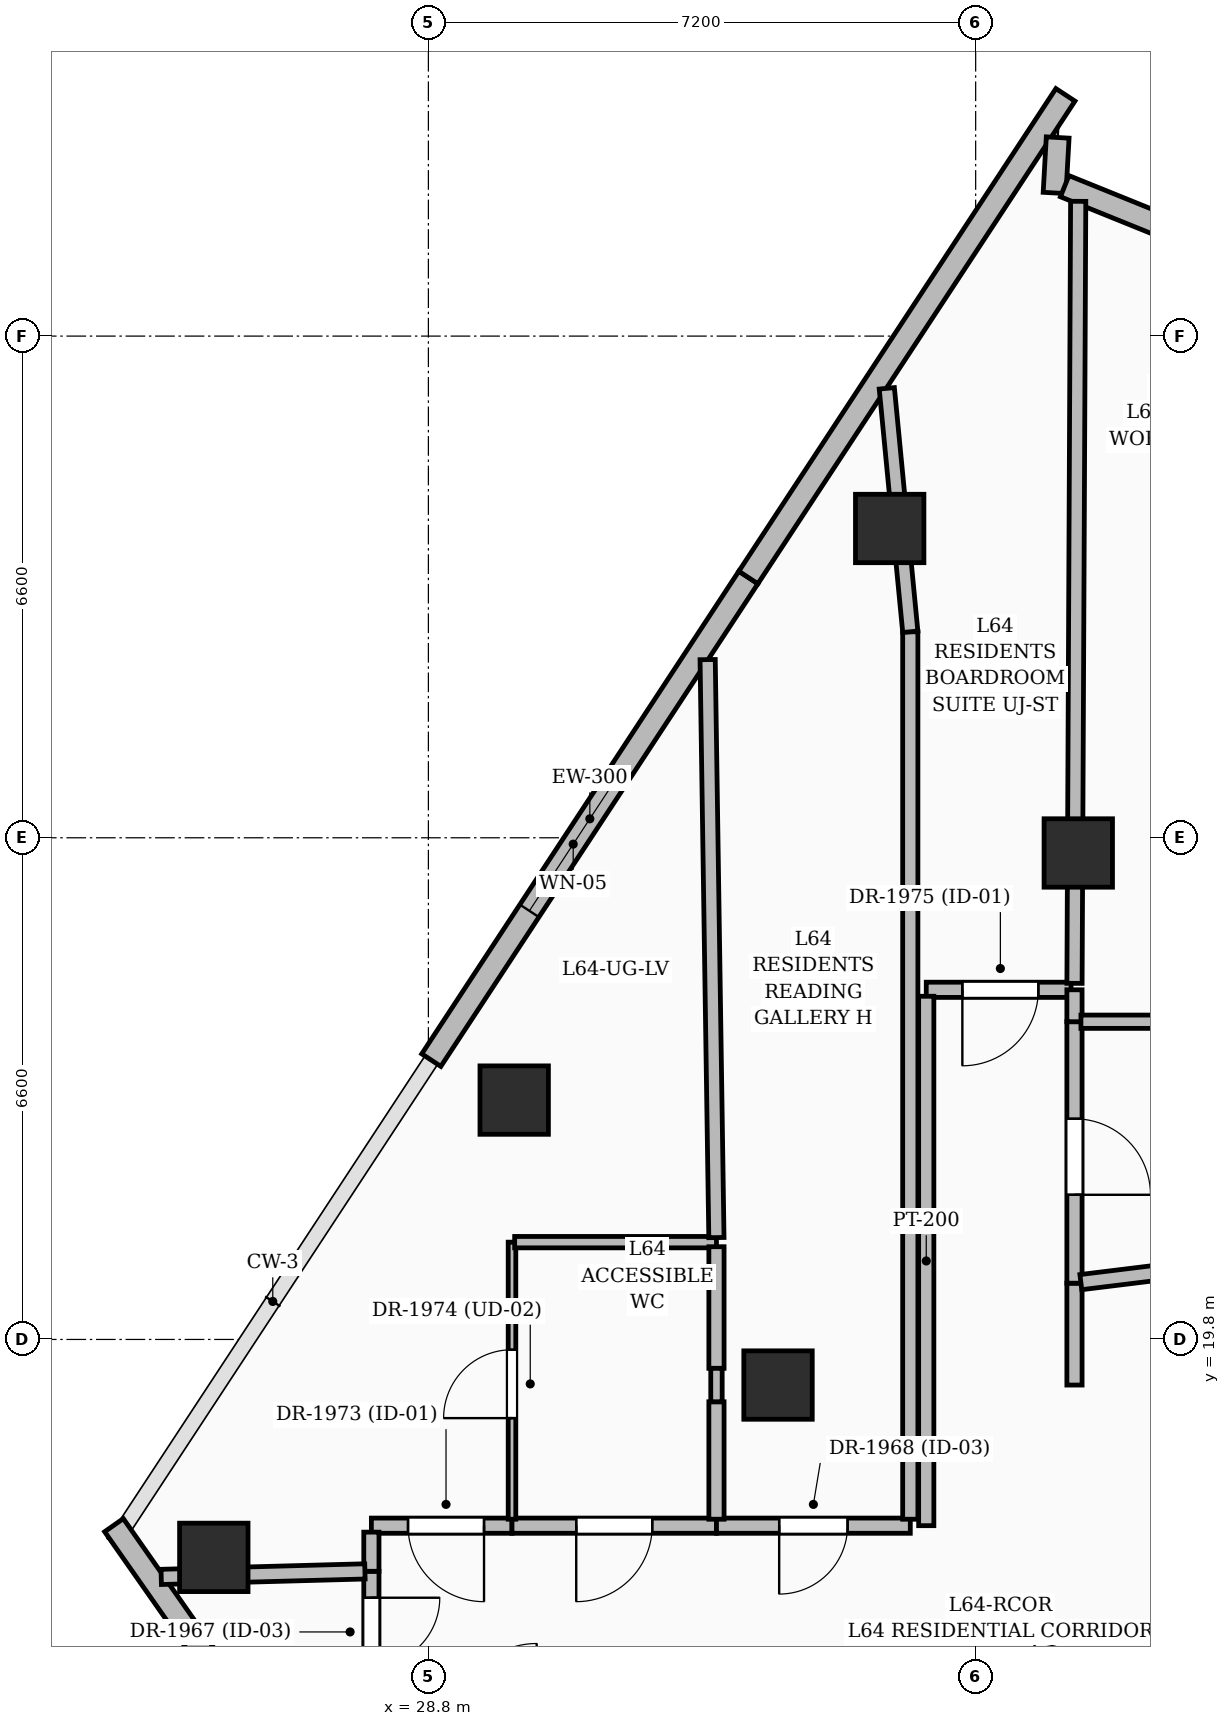
"""IFC4 building model, lengths in metres.
Left out: names, types, materials, properties, quantities, classifications, styles, units other than length and angle.
Written with IfcOpenShell. Run it as: python <this file> out.ifc"""

import sys

from ifc_helpers import new_model, si_unit, direction, frame, frame_2d, origin, origin_2d, place, context, subcontext, project, spatial, rectangle, extrude, element, fill, save


model = new_model("IFC4")
c1 = context("Model", 3, precision=1e-05, world=origin(), true_north=direction((0.0, 1.0)))
c2 = subcontext(c1, "Body", "Model", "MODEL_VIEW")
j1 = project(units=[si_unit("LENGTHUNIT", "METRE"), si_unit("PLANEANGLEUNIT", "RADIAN")], contexts=[c1])
p1 = place(None, origin())
s1 = spatial("IfcSite", under=j1, at=p1, CompositionType="ELEMENT")
p2 = place(p1, origin())
s2 = spatial("IfcBuilding", under=s1, at=p2, CompositionType="ELEMENT")
p3 = place(p2, frame((0.0, 0.0, 248.25)))
s3 = spatial("IfcBuildingStorey", under=s2, at=p3, CompositionType="ELEMENT", Elevation=248.25)
for number, where, z_axis, x_axis in (
    (1, (37.35, 26.2, 0.0), (0.0, 0.0, 1.0), (1.0, 0.0, 0.0)),
    (2, (33.4, 19.2, 0.0), (0.0, 0.0, 1.0), (1.0, 0.0, 0.0)),
    (3, (34.869, 30.469, 0.0), (0.0, 0.0, 1.0), (1.0, 0.0, 0.0)),
    (4, (29.929, 22.949, 0.0), (0.0, 0.0, 1.0), (1.0, 0.0, 0.0)),
    (5, (25.977, 16.933, 0.0), (0.0, 0.0, 1.0), (1.0, 0.0, 0.0)),
):
    element("IfcColumn", number, at=place(p3, frame(where, z_axis=z_axis, x_axis=x_axis)), inside=s3, PredefinedType="COLUMN", context=c2, shape_type="SweptSolid", body=[
        extrude(rectangle(XDim=0.9, YDim=0.9, at=origin_2d()), origin(), (0.0, 0.0, 1.0), 3.75),
    ])
p4 = place(p3, frame((26.151, 15.232, 0.0), z_axis=(0.0, 0.0, 1.0), x_axis=(-0.573607655321, 0.819130183644, 0.0)))
e6 = element("IfcWall", 6, at=p4, inside=s3, PredefinedType="SOLIDWALL", context=c2, shape_type="SweptSolid", body=[
    extrude(rectangle(XDim=2.593, YDim=0.3, at=frame_2d((1.297, 0.0))), origin(), (0.0, 0.0, 1.0), 2.825),
])
p5 = place(p3, frame((28.838, 23.475, 0.0), z_axis=(0.0, 0.0, 1.0), x_axis=(0.549043857383, 0.835793540697, 0.0)))
e7 = element("IfcWall", 7, at=p5, inside=s3, PredefinedType="SOLIDWALL", context=c2, shape_type="SweptSolid", body=[
    extrude(rectangle(XDim=7.597, YDim=0.3, at=frame_2d((3.799, 0.0))), origin(), (0.0, 0.0, 1.0), 3.5),
])
p6 = place(p5, frame((2.35, 0.0, 0.55)))
e8 = element("IfcOpeningElement", 8, at=p6, cuts=e7, PredefinedType="OPENING", context=c2, shape_type="SweptSolid", body=[
    extrude(rectangle(XDim=2.1, YDim=2.4, at=frame_2d((1.05, 1.2))), frame((0.0, 0.16, 0.0), z_axis=(0.0, -1.0, 0.0), x_axis=(1.0, 0.0, 0.0)), (0.0, 0.0, 1.0), 0.32),
])
p7 = place(p3, frame((33.01, 29.824, 0.0), z_axis=(0.0, 0.0, 1.0), x_axis=(0.549051558848, 0.835788481451, 0.0)))
e9 = element("IfcWall", 9, at=p7, inside=s3, PredefinedType="SOLIDWALL", context=c2, shape_type="SweptSolid", body=[
    extrude(rectangle(XDim=7.597, YDim=0.3, at=frame_2d((3.799, 0.0))), origin(), (0.0, 0.0, 1.0), 3.5),
])
p8 = place(p3, frame((37.079, 35.613, 0.0), z_axis=(0.0, 0.0, 1.0), x_axis=(-0.056136239568, -0.998423118025, 0.0)))
e10 = element("IfcWall", 10, at=p8, inside=s3, PredefinedType="SOLIDWALL", context=c2, shape_type="SweptSolid", body=[
    extrude(rectangle(XDim=0.731, YDim=0.3, at=frame_2d((0.365, 0.0))), origin(), (0.0, 0.0, 1.0), 3.5),
])
p9 = place(p3, frame((37.171, 34.972, 0.0), z_axis=(0.0, 0.0, 1.0), x_axis=(0.927076098221, -0.37487318937, 0.0)))
e11 = element("IfcWall", 11, at=p9, inside=s3, PredefinedType="SOLIDWALL", context=c2, shape_type="SweptSolid", body=[
    extrude(rectangle(XDim=2.126, YDim=0.3, at=frame_2d((1.063, 0.0))), origin(), (0.0, 0.0, 1.0), 3.5),
])
p10 = place(p3, frame((28.05, 16.75, 0.0), z_axis=(0.0, 0.0, 1.0), x_axis=(0.0, -1.0, 0.0)))
e12 = element("IfcWall", 12, at=p10, inside=s3, PredefinedType="PARTITIONING", context=c2, shape_type="SweptSolid", body=[
    extrude(rectangle(XDim=1.7, YDim=0.2, at=frame_2d((0.85, 0.0))), origin(), (0.0, 0.0, 1.0), 3.5),
])
p11 = place(p10, frame((0.348, 0.0, 0.0)))
e13 = element("IfcOpeningElement", 13, at=p11, cuts=e12, PredefinedType="OPENING", context=c2, shape_type="SweptSolid", body=[
    extrude(rectangle(XDim=0.9, YDim=2.1, at=frame_2d((0.45, 1.05))), frame((0.0, 0.11, 0.0), z_axis=(0.0, -1.0, 0.0), x_axis=(1.0, 0.0, 0.0)), (0.0, 0.0, 1.0), 0.22),
])
p12 = place(p3, frame((37.3, 19.2, 0.0), z_axis=(0.0, 0.0, 1.0), x_axis=(0.0, 1.0, 0.0)))
e14 = element("IfcWall", 14, at=p12, inside=s3, PredefinedType="PARTITIONING", context=c2, shape_type="SweptSolid", body=[
    extrude(rectangle(XDim=1.34, YDim=0.2, at=frame_2d((0.67, 0.0))), origin(), (0.0, 0.0, 1.0), 3.5),
])
p13 = place(p3, frame((29.9, 17.35, 0.0), z_axis=(0.0, 0.0, 1.0), x_axis=(-1.0, 0.0, 0.0)))
e15 = element("IfcWall", 15, at=p13, inside=s3, PredefinedType="PARTITIONING", context=c2, shape_type="SweptSolid", body=[
    extrude(rectangle(XDim=1.85, YDim=0.2, at=frame_2d((0.925, 0.0))), origin(), (0.0, 0.0, 1.0), 3.5),
])
p14 = place(p13, frame((0.368, 0.0, 0.0)))
e16 = element("IfcOpeningElement", 16, at=p14, cuts=e15, PredefinedType="OPENING", context=c2, shape_type="SweptSolid", body=[
    extrude(rectangle(XDim=1.0, YDim=2.2, at=frame_2d((0.5, 1.1))), frame((0.0, 0.11, 0.0), z_axis=(0.0, -1.0, 0.0), x_axis=(1.0, 0.0, 0.0)), (0.0, 0.0, 1.0), 0.22),
])
p15 = place(p3, frame((28.05, 17.265, 0.0), z_axis=(0.0, 0.0, 1.0), x_axis=(0.0, -1.0, 0.0)))
e17 = element("IfcWall", 17, at=p15, inside=s3, PredefinedType="PARTITIONING", context=c2, shape_type="SweptSolid", body=[
    extrude(rectangle(XDim=0.515, YDim=0.2, at=frame_2d((0.257, 0.0))), origin(), (0.0, 0.0, 1.0), 3.5),
])
p16 = place(p3, frame((32.59, 17.35, 0.0), z_axis=(0.0, 0.0, 1.0), x_axis=(-1.0, 0.0, 0.0)))
e18 = element("IfcWall", 18, at=p16, inside=s3, PredefinedType="PARTITIONING", context=c2, shape_type="SweptSolid", body=[
    extrude(rectangle(XDim=2.69, YDim=0.2, at=frame_2d((1.345, 0.0))), origin(), (0.0, 0.0, 1.0), 3.5),
])
p17 = place(p16, frame((0.845, 0.0, 0.0)))
e19 = element("IfcOpeningElement", 19, at=p17, cuts=e18, PredefinedType="OPENING", context=c2, shape_type="SweptSolid", body=[
    extrude(rectangle(XDim=1.0, YDim=2.2, at=frame_2d((0.5, 1.1))), frame((0.0, 0.11, 0.0), z_axis=(0.0, -1.0, 0.0), x_axis=(1.0, 0.0, 0.0)), (0.0, 0.0, 1.0), 0.22),
])
p18 = place(p3, frame((35.14, 17.35, 0.0), z_axis=(0.0, 0.0, 1.0), x_axis=(-1.0, 0.0, 0.0)))
e20 = element("IfcWall", 20, at=p18, inside=s3, PredefinedType="PARTITIONING", context=c2, shape_type="SweptSolid", body=[
    extrude(rectangle(XDim=2.55, YDim=0.2, at=frame_2d((1.275, 0.0))), origin(), (0.0, 0.0, 1.0), 2.685),
])
p19 = place(p18, frame((0.825, 0.0, 0.0)))
e21 = element("IfcOpeningElement", 21, at=p19, cuts=e20, PredefinedType="OPENING", context=c2, shape_type="SweptSolid", body=[
    extrude(rectangle(XDim=0.9, YDim=2.1, at=frame_2d((0.45, 1.05))), frame((0.0, 0.11, 0.0), z_axis=(0.0, -1.0, 0.0), x_axis=(1.0, 0.0, 0.0)), (0.0, 0.0, 1.0), 0.22),
])
p20 = place(p3, frame((37.255, 24.4, 0.0), z_axis=(0.0, 0.0, 1.0), x_axis=(-1.0, 0.0, 0.0)))
e22 = element("IfcWall", 22, at=p20, inside=s3, PredefinedType="PARTITIONING", context=c2, shape_type="SweptSolid", body=[
    extrude(rectangle(XDim=1.905, YDim=0.2, at=frame_2d((0.952, 0.0))), origin(), (0.0, 0.0, 1.0), 2.685),
])
p21 = place(p20, frame((0.43, 0.0, 0.0)))
e23 = element("IfcOpeningElement", 23, at=p21, cuts=e22, PredefinedType="OPENING", context=c2, shape_type="SweptSolid", body=[
    extrude(rectangle(XDim=1.0, YDim=2.2, at=frame_2d((0.5, 1.1))), frame((0.0, 0.11, 0.0), z_axis=(0.0, -1.0, 0.0), x_axis=(1.0, 0.0, 0.0)), (0.0, 0.0, 1.0), 0.22),
])
p22 = place(p3, frame((35.35, 24.315, 0.0), z_axis=(0.0, 0.0, 1.0), x_axis=(0.0, -1.0, 0.0)))
e24 = element("IfcWall", 24, at=p22, inside=s3, PredefinedType="PARTITIONING", context=c2, shape_type="SweptSolid", body=[
    extrude(rectangle(XDim=6.965, YDim=0.2, at=frame_2d((3.482, 0.0))), origin(), (0.0, 0.0, 1.0), 2.685),
])
p23 = place(p3, frame((37.3, 23.98, 0.0), z_axis=(0.0, 0.0, 1.0), x_axis=(0.0, -1.0, 0.0)))
e25 = element("IfcWall", 25, at=p23, inside=s3, PredefinedType="PARTITIONING", context=c2, shape_type="SweptSolid", body=[
    extrude(rectangle(XDim=3.44, YDim=0.2, at=frame_2d((1.72, 0.0))), origin(), (0.0, 0.0, 1.0), 3.5),
])
p24 = place(p23, frame((1.277, 0.0, 0.0)))
e26 = element("IfcOpeningElement", 26, at=p24, cuts=e25, PredefinedType="OPENING", context=c2, shape_type="SweptSolid", body=[
    extrude(rectangle(XDim=1.0, YDim=2.2, at=frame_2d((0.5, 1.1))), frame((0.0, 0.11, 0.0), z_axis=(0.0, -1.0, 0.0), x_axis=(1.0, 0.0, 0.0)), (0.0, 0.0, 1.0), 0.22),
])
p25 = place(p3, frame((37.3, 23.98, 0.0), z_axis=(0.0, 0.0, 1.0), x_axis=(0.0, 1.0, 0.0)))
e27 = element("IfcWall", 27, at=p25, inside=s3, PredefinedType="PARTITIONING", context=c2, shape_type="SweptSolid", body=[
    extrude(rectangle(XDim=0.42, YDim=0.2, at=frame_2d((0.21, 0.0))), origin(), (0.0, 0.0, 1.0), 3.5),
])
p26 = place(p3, frame((27.965, 16.749, 0.0), z_axis=(0.0, 0.0, 1.0), x_axis=(-0.999634238385, -0.027044212862, 0.0)))
e28 = element("IfcWall", 28, at=p26, inside=s3, PredefinedType="PARTITIONING", context=c2, shape_type="SweptSolid", body=[
    extrude(rectangle(XDim=2.681, YDim=0.2, at=frame_2d((1.341, 0.0))), origin(), (0.0, 0.0, 1.0), 2.82),
])
p27 = place(p3, frame((44.69, 21.453, 0.0), z_axis=(0.0, 0.0, 1.0), x_axis=(-0.992524860777, -0.12204261854, 0.0)))
e29 = element("IfcWall", 29, at=p27, inside=s3, PredefinedType="PARTITIONING", context=c2, shape_type="SweptSolid", body=[
    extrude(rectangle(XDim=7.362, YDim=0.2, at=frame_2d((3.681, 0.0))), origin(), (0.0, 0.0, 1.0), 2.685),
])
p28 = place(p3, frame((29.9, 17.435, 0.0), z_axis=(0.0, 0.0, 1.0), x_axis=(0.0, 1.0, 0.0)))
e30 = element("IfcWall", 30, at=p28, inside=s3, PredefinedType="PARTITIONING", context=c2, shape_type="SweptSolid", body=[
    extrude(rectangle(XDim=3.645, YDim=0.1, at=frame_2d((1.823, 0.0))), origin(), (0.0, 0.0, 1.0), 3.5),
])
p29 = place(p28, frame((1.33, 0.0, 0.0)))
e31 = element("IfcOpeningElement", 31, at=p29, cuts=e30, PredefinedType="OPENING", context=c2, shape_type="SweptSolid", body=[
    extrude(rectangle(XDim=0.9, YDim=2.15, at=frame_2d((0.45, 1.075))), frame((0.0, 0.06, 0.0), z_axis=(0.0, -1.0, 0.0), x_axis=(1.0, 0.0, 0.0)), (0.0, 0.0, 1.0), 0.12),
])
p30 = place(p3, frame((29.935, 21.08, 0.0), z_axis=(0.0, 0.0, 1.0), x_axis=(1.0, 0.0, 0.0)))
e32 = element("IfcWall", 32, at=p30, inside=s3, PredefinedType="PARTITIONING", context=c2, shape_type="SweptSolid", body=[
    extrude(rectangle(XDim=2.655, YDim=0.15, at=frame_2d((1.328, 0.0))), origin(), (0.0, 0.0, 1.0), 1.27),
])
p31 = place(p3, frame((32.589, 21.14, 0.0), z_axis=(0.0, 0.0, 1.0), x_axis=(-0.015152694096, 0.99988519134, 0.0)))
e33 = element("IfcWall", 33, at=p31, inside=s3, PredefinedType="PARTITIONING", context=c2, shape_type="SweptSolid", body=[
    extrude(rectangle(XDim=7.605, YDim=0.2, at=frame_2d((3.802, 0.0))), origin(), (0.0, 0.0, 1.0), 2.82),
])
p32 = place(p3, frame((32.59, 17.435, 0.0), z_axis=(0.0, 0.0, 1.0), x_axis=(0.0, 1.0, 0.0)))
e34 = element("IfcWall", 34, at=p32, inside=s3, PredefinedType="PARTITIONING", context=c2, shape_type="SweptSolid", body=[
    extrude(rectangle(XDim=1.545, YDim=0.2, at=frame_2d((0.772, 0.0))), origin(), (0.0, 0.0, 1.0), 3.5),
])
p33 = place(p3, frame((32.59, 19.42, 0.0), z_axis=(0.0, 0.0, 1.0), x_axis=(0.0, 1.0, 0.0)))
e35 = element("IfcWall", 35, at=p33, inside=s3, PredefinedType="PARTITIONING", context=c2, shape_type="SweptSolid", body=[
    extrude(rectangle(XDim=1.6, YDim=0.2, at=frame_2d((0.8, 0.0))), origin(), (0.0, 0.0, 1.0), 1.27),
])
p34 = place(p3, frame((35.14, 17.435, 0.0), z_axis=(0.0, 0.0, 1.0), x_axis=(0.0, 1.0, 0.0)))
e36 = element("IfcWall", 36, at=p34, inside=s3, PredefinedType="PARTITIONING", context=c2, shape_type="SweptSolid", body=[
    extrude(rectangle(XDim=11.675, YDim=0.2, at=frame_2d((5.837, 0.0))), origin(), (0.0, 0.0, 1.0), 1.27),
])
p35 = place(p3, frame((35.14, 29.11, 0.0), z_axis=(0.0, 0.0, 1.0), x_axis=(-0.095979864608, 0.995383275723, 0.0)))
e37 = element("IfcWall", 37, at=p35, inside=s3, PredefinedType="PARTITIONING", context=c2, shape_type="SweptSolid", body=[
    extrude(rectangle(XDim=3.218, YDim=0.2, at=frame_2d((1.609, 0.0))), origin(), (0.0, 0.0, 1.0), 1.27),
])
p36 = place(p3, frame((40.92, 23.98, 0.0), z_axis=(0.0, 0.0, 1.0), x_axis=(-1.0, 0.0, 0.0)))
e38 = element("IfcWall", 38, at=p36, inside=s3, PredefinedType="PARTITIONING", context=c2, shape_type="SweptSolid", body=[
    extrude(rectangle(XDim=3.535, YDim=0.175, at=frame_2d((1.768, 0.0))), origin(), (0.0, 0.0, 1.0), 3.5),
])
p37 = place(p3, frame((37.3, 24.485, 0.0), z_axis=(0.0, 0.0, 1.0), x_axis=(0.004746143653, 0.999988736997, 0.0)))
e39 = element("IfcWall", 39, at=p37, inside=s3, PredefinedType="PARTITIONING", context=c2, shape_type="SweptSolid", body=[
    extrude(rectangle(XDim=10.288, YDim=0.2, at=frame_2d((5.144, 0.0))), origin(), (0.0, 0.0, 1.0), 1.27),
])
p38 = place(p3, frame((32.59, 18.98, 0.0), z_axis=(0.0, 0.0, 1.0), x_axis=(0.0, 1.0, 0.0)))
e40 = element("IfcWall", 40, at=p38, inside=s3, PredefinedType="PARTITIONING", context=c2, shape_type="SweptSolid", body=[
    extrude(rectangle(XDim=0.44, YDim=0.15, at=frame_2d((0.22, 0.0))), origin(), (0.0, 0.0, 1.0), 1.27),
])
p39 = place(p6, origin())
e41 = element("IfcWindow", 41, at=p39, inside=s3, PartitioningType="SINGLE_PANEL", PredefinedType="WINDOW", context=c2, shape_type="SweptSolid", body=[
    extrude(rectangle(XDim=2.1, YDim=2.4, at=frame_2d((1.05, 1.2))), frame((0.0, 0.03, 0.0), z_axis=(0.0, -1.0, 0.0), x_axis=(1.0, 0.0, 0.0)), (0.0, 0.0, 1.0), 0.06),
])
fill(e8, e41)
p40 = place(p11, origin())
e42 = element("IfcDoor", 42, at=p40, inside=s3, OperationType="SINGLE_SWING_LEFT", PredefinedType="DOOR", context=c2, shape_type="SweptSolid", body=[
    extrude(rectangle(XDim=0.9, YDim=2.1, at=frame_2d((0.45, 1.05))), frame((0.0, 0.025, 0.0), z_axis=(0.0, -1.0, 0.0), x_axis=(1.0, 0.0, 0.0)), (0.0, 0.0, 1.0), 0.05),
])
fill(e13, e42)
p41 = place(p19, origin())
e43 = element("IfcDoor", 43, at=p41, inside=s3, OperationType="SINGLE_SWING_RIGHT", PredefinedType="DOOR", context=c2, shape_type="SweptSolid", body=[
    extrude(rectangle(XDim=0.9, YDim=2.1, at=frame_2d((0.45, 1.05))), frame((0.0, 0.025, 0.0), z_axis=(0.0, -1.0, 0.0), x_axis=(1.0, 0.0, 0.0)), (0.0, 0.0, 1.0), 0.05),
])
fill(e21, e43)
p42 = place(p14, origin())
e44 = element("IfcDoor", 44, at=p42, inside=s3, OperationType="SINGLE_SWING_LEFT", PredefinedType="DOOR", context=c2, shape_type="SweptSolid", body=[
    extrude(rectangle(XDim=1.0, YDim=2.2, at=frame_2d((0.5, 1.1))), frame((0.0, 0.025, 0.0), z_axis=(0.0, -1.0, 0.0), x_axis=(1.0, 0.0, 0.0)), (0.0, 0.0, 1.0), 0.05),
])
fill(e16, e44)
p43 = place(p29, origin())
e45 = element("IfcDoor", 45, at=p43, inside=s3, OperationType="SINGLE_SWING_LEFT", PredefinedType="DOOR", context=c2, shape_type="SweptSolid", body=[
    extrude(rectangle(XDim=0.9, YDim=2.15, at=frame_2d((0.45, 1.075))), frame((0.0, 0.025, 0.0), z_axis=(0.0, -1.0, 0.0), x_axis=(1.0, 0.0, 0.0)), (0.0, 0.0, 1.0), 0.05),
])
fill(e31, e45)
p44 = place(p21, origin())
e46 = element("IfcDoor", 46, at=p44, inside=s3, OperationType="SINGLE_SWING_RIGHT", PredefinedType="DOOR", context=c2, shape_type="SweptSolid", body=[
    extrude(rectangle(XDim=1.0, YDim=2.2, at=frame_2d((0.5, 1.1))), frame((0.0, 0.025, 0.0), z_axis=(0.0, -1.0, 0.0), x_axis=(1.0, 0.0, 0.0)), (0.0, 0.0, 1.0), 0.05),
])
fill(e23, e46)
p45 = place(p24, origin())
e47 = element("IfcDoor", 47, at=p45, inside=s3, OperationType="SINGLE_SWING_RIGHT", PredefinedType="DOOR", context=c2, shape_type="SweptSolid", body=[
    extrude(rectangle(XDim=1.0, YDim=2.2, at=frame_2d((0.5, 1.1))), frame((0.0, 0.025, 0.0), z_axis=(0.0, -1.0, 0.0), x_axis=(1.0, 0.0, 0.0)), (0.0, 0.0, 1.0), 0.05),
])
fill(e26, e47)
p46 = place(p17, origin())
e48 = element("IfcDoor", 48, at=p46, inside=s3, OperationType="SINGLE_SWING_RIGHT", PredefinedType="DOOR", context=c2, shape_type="SweptSolid", body=[
    extrude(rectangle(XDim=1.0, YDim=2.2, at=frame_2d((0.5, 1.1))), frame((0.0, 0.025, 0.0), z_axis=(0.0, -1.0, 0.0), x_axis=(1.0, 0.0, 0.0)), (0.0, 0.0, 1.0), 0.05),
])
fill(e19, e48)
save(model, sys.argv[1])
